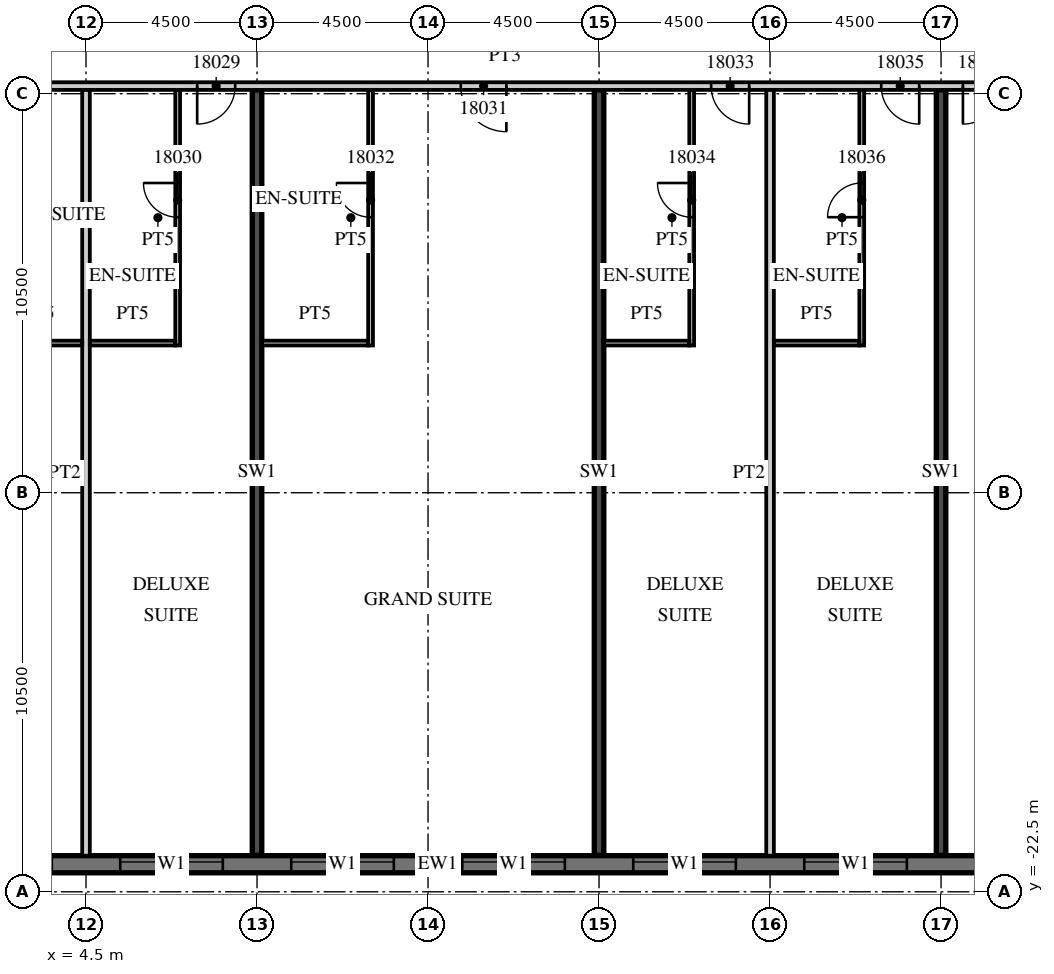
"""IFC4 building model, lengths in metres.
Left out: names, types, materials, properties, quantities, classifications, styles, units other than length and angle.
Written with IfcOpenShell. Run it as: python <this file> out.ifc"""

import sys

from ifc_helpers import new_model, si_unit, direction, frame, frame_2d, origin, place, context, subcontext, project, spatial, rectangle, extrude, element, fill, save


model = new_model("IFC4")
c1 = context("Model", 3, precision=1e-05, world=origin(), true_north=direction((0.0, 1.0)))
c2 = subcontext(c1, "Body", "Model", "MODEL_VIEW")
j1 = project(units=[si_unit("LENGTHUNIT", "METRE"), si_unit("PLANEANGLEUNIT", "RADIAN")], contexts=[c1])
p1 = place(None, origin())
s1 = spatial("IfcSite", under=j1, at=p1, CompositionType="ELEMENT")
p2 = place(p1, origin())
s2 = spatial("IfcBuilding", under=s1, at=p2, CompositionType="ELEMENT")
p3 = place(p2, frame((0.0, 0.0, 89.7)))
s3 = spatial("IfcBuildingStorey", under=s2, at=p3, CompositionType="ELEMENT", Elevation=89.7)
for number, where, z_axis, x_axis in (
    (1, (9.0, -21.54, 0.0), (0.0, 0.0, 1.0), (0.0, 1.0, 0.0)),
    (2, (18.0, -21.54, 0.0), (0.0, 0.0, 1.0), (0.0, 1.0, 0.0)),
    (3, (27.0, -21.54, 0.0), (0.0, 0.0, 1.0), (0.0, 1.0, 0.0)),
):
    element("IfcWall", number, at=place(p3, frame(where, z_axis=z_axis, x_axis=x_axis)), inside=s3, PredefinedType="SHEAR", context=c2, shape_type="SweptSolid", body=[
        extrude(rectangle(XDim=20.14, YDim=0.25, at=frame_2d((10.07, 0.0))), origin(), (0.0, 0.0, 1.0), 3.3),
    ])
p4 = place(p3, frame((-13.5, -21.775, 0.0), z_axis=(0.0, 0.0, 1.0), x_axis=(1.0, 0.0, 0.0)))
e4 = element("IfcWall", 4, at=p4, inside=s3, PredefinedType="SOLIDWALL", context=c2, shape_type="SweptSolid", body=[
    extrude(rectangle(XDim=54.5, YDim=0.45, at=frame_2d((27.25, 0.0))), origin(), (0.0, 0.0, 1.0), 3.02),
])
p5 = place(p4, frame((0.9, 0.0, 0.45)))
e5 = element("IfcOpeningElement", 5, at=p5, cuts=e4, PredefinedType="OPENING", context=c2, shape_type="SweptSolid", body=[
    extrude(rectangle(XDim=2.7, YDim=2.25, at=frame_2d((1.35, 1.125))), frame((0.0, 0.235, 0.0), z_axis=(0.0, -1.0, 0.0), x_axis=(1.0, 0.0, 0.0)), (0.0, 0.0, 1.0), 0.47),
])
p6 = place(p4, frame((5.4, 0.0, 0.45)))
e6 = element("IfcOpeningElement", 6, at=p6, cuts=e4, PredefinedType="OPENING", context=c2, shape_type="SweptSolid", body=[
    extrude(rectangle(XDim=2.7, YDim=2.25, at=frame_2d((1.35, 1.125))), frame((0.0, 0.235, 0.0), z_axis=(0.0, -1.0, 0.0), x_axis=(1.0, 0.0, 0.0)), (0.0, 0.0, 1.0), 0.47),
])
p7 = place(p4, frame((9.9, 0.0, 0.45)))
e7 = element("IfcOpeningElement", 7, at=p7, cuts=e4, PredefinedType="OPENING", context=c2, shape_type="SweptSolid", body=[
    extrude(rectangle(XDim=2.7, YDim=2.25, at=frame_2d((1.35, 1.125))), frame((0.0, 0.235, 0.0), z_axis=(0.0, -1.0, 0.0), x_axis=(1.0, 0.0, 0.0)), (0.0, 0.0, 1.0), 0.47),
])
p8 = place(p4, frame((14.4, 0.0, 0.45)))
e8 = element("IfcOpeningElement", 8, at=p8, cuts=e4, PredefinedType="OPENING", context=c2, shape_type="SweptSolid", body=[
    extrude(rectangle(XDim=2.7, YDim=2.25, at=frame_2d((1.35, 1.125))), frame((0.0, 0.235, 0.0), z_axis=(0.0, -1.0, 0.0), x_axis=(1.0, 0.0, 0.0)), (0.0, 0.0, 1.0), 0.47),
])
p9 = place(p4, frame((18.9, 0.0, 0.45)))
e9 = element("IfcOpeningElement", 9, at=p9, cuts=e4, PredefinedType="OPENING", context=c2, shape_type="SweptSolid", body=[
    extrude(rectangle(XDim=2.7, YDim=2.25, at=frame_2d((1.35, 1.125))), frame((0.0, 0.235, 0.0), z_axis=(0.0, -1.0, 0.0), x_axis=(1.0, 0.0, 0.0)), (0.0, 0.0, 1.0), 0.47),
])
p10 = place(p4, frame((23.4, 0.0, 0.45)))
e10 = element("IfcOpeningElement", 10, at=p10, cuts=e4, PredefinedType="OPENING", context=c2, shape_type="SweptSolid", body=[
    extrude(rectangle(XDim=2.7, YDim=2.25, at=frame_2d((1.35, 1.125))), frame((0.0, 0.235, 0.0), z_axis=(0.0, -1.0, 0.0), x_axis=(1.0, 0.0, 0.0)), (0.0, 0.0, 1.0), 0.47),
])
p11 = place(p4, frame((27.9, 0.0, 0.45)))
e11 = element("IfcOpeningElement", 11, at=p11, cuts=e4, PredefinedType="OPENING", context=c2, shape_type="SweptSolid", body=[
    extrude(rectangle(XDim=2.7, YDim=2.25, at=frame_2d((1.35, 1.125))), frame((0.0, 0.235, 0.0), z_axis=(0.0, -1.0, 0.0), x_axis=(1.0, 0.0, 0.0)), (0.0, 0.0, 1.0), 0.47),
])
p12 = place(p4, frame((32.4, 0.0, 0.45)))
e12 = element("IfcOpeningElement", 12, at=p12, cuts=e4, PredefinedType="OPENING", context=c2, shape_type="SweptSolid", body=[
    extrude(rectangle(XDim=2.7, YDim=2.25, at=frame_2d((1.35, 1.125))), frame((0.0, 0.235, 0.0), z_axis=(0.0, -1.0, 0.0), x_axis=(1.0, 0.0, 0.0)), (0.0, 0.0, 1.0), 0.47),
])
p13 = place(p4, frame((36.9, 0.0, 0.45)))
e13 = element("IfcOpeningElement", 13, at=p13, cuts=e4, PredefinedType="OPENING", context=c2, shape_type="SweptSolid", body=[
    extrude(rectangle(XDim=2.7, YDim=2.25, at=frame_2d((1.35, 1.125))), frame((0.0, 0.235, 0.0), z_axis=(0.0, -1.0, 0.0), x_axis=(1.0, 0.0, 0.0)), (0.0, 0.0, 1.0), 0.47),
])
p14 = place(p4, frame((41.4, 0.0, 0.45)))
e14 = element("IfcOpeningElement", 14, at=p14, cuts=e4, PredefinedType="OPENING", context=c2, shape_type="SweptSolid", body=[
    extrude(rectangle(XDim=2.7, YDim=2.25, at=frame_2d((1.35, 1.125))), frame((0.0, 0.235, 0.0), z_axis=(0.0, -1.0, 0.0), x_axis=(1.0, 0.0, 0.0)), (0.0, 0.0, 1.0), 0.47),
])
p15 = place(p4, frame((45.9, 0.0, 0.45)))
e15 = element("IfcOpeningElement", 15, at=p15, cuts=e4, PredefinedType="OPENING", context=c2, shape_type="SweptSolid", body=[
    extrude(rectangle(XDim=2.7, YDim=2.25, at=frame_2d((1.35, 1.125))), frame((0.0, 0.235, 0.0), z_axis=(0.0, -1.0, 0.0), x_axis=(1.0, 0.0, 0.0)), (0.0, 0.0, 1.0), 0.47),
])
p16 = place(p4, frame((50.4, 0.0, 0.45)))
e16 = element("IfcOpeningElement", 16, at=p16, cuts=e4, PredefinedType="OPENING", context=c2, shape_type="SweptSolid", body=[
    extrude(rectangle(XDim=2.7, YDim=2.25, at=frame_2d((1.35, 1.125))), frame((0.0, 0.235, 0.0), z_axis=(0.0, -1.0, 0.0), x_axis=(1.0, 0.0, 0.0)), (0.0, 0.0, 1.0), 0.47),
])
p17 = place(p3, frame((-13.5, -1.3, 0.0), z_axis=(0.0, 0.0, 1.0), x_axis=(1.0, 0.0, 0.0)))
e17 = element("IfcWall", 17, at=p17, inside=s3, PredefinedType="PARTITIONING", context=c2, shape_type="SweptSolid", body=[
    extrude(rectangle(XDim=58.05, YDim=0.2, at=frame_2d((29.025, 0.0))), origin(), (0.0, 0.0, 1.0), 3.02),
])
p18 = place(p17, frame((2.925, 0.0, 0.0)))
e18 = element("IfcOpeningElement", 18, at=p18, cuts=e17, PredefinedType="OPENING", context=c2, shape_type="SweptSolid", body=[
    extrude(rectangle(XDim=1.0, YDim=2.1, at=frame_2d((0.5, 1.05))), frame((0.0, 0.11, 0.0), z_axis=(0.0, -1.0, 0.0), x_axis=(1.0, 0.0, 0.0)), (0.0, 0.0, 1.0), 0.22),
])
p19 = place(p17, frame((5.075, 0.0, 0.0)))
e19 = element("IfcOpeningElement", 19, at=p19, cuts=e17, PredefinedType="OPENING", context=c2, shape_type="SweptSolid", body=[
    extrude(rectangle(XDim=1.0, YDim=2.1, at=frame_2d((0.5, 1.05))), frame((0.0, 0.11, 0.0), z_axis=(0.0, -1.0, 0.0), x_axis=(1.0, 0.0, 0.0)), (0.0, 0.0, 1.0), 0.22),
])
p20 = place(p17, frame((9.55, 0.0, 0.0)))
e20 = element("IfcOpeningElement", 20, at=p20, cuts=e17, PredefinedType="OPENING", context=c2, shape_type="SweptSolid", body=[
    extrude(rectangle(XDim=1.0, YDim=2.1, at=frame_2d((0.5, 1.05))), frame((0.0, 0.11, 0.0), z_axis=(0.0, -1.0, 0.0), x_axis=(1.0, 0.0, 0.0)), (0.0, 0.0, 1.0), 0.22),
])
p21 = place(p17, frame((14.075, 0.0, 0.0)))
e21 = element("IfcOpeningElement", 21, at=p21, cuts=e17, PredefinedType="OPENING", context=c2, shape_type="SweptSolid", body=[
    extrude(rectangle(XDim=1.0, YDim=2.1, at=frame_2d((0.5, 1.05))), frame((0.0, 0.11, 0.0), z_axis=(0.0, -1.0, 0.0), x_axis=(1.0, 0.0, 0.0)), (0.0, 0.0, 1.0), 0.22),
])
p22 = place(p17, frame((20.925, 0.0, 0.0)))
e22 = element("IfcOpeningElement", 22, at=p22, cuts=e17, PredefinedType="OPENING", context=c2, shape_type="SweptSolid", body=[
    extrude(rectangle(XDim=1.0, YDim=2.1, at=frame_2d((0.5, 1.05))), frame((0.0, 0.11, 0.0), z_axis=(0.0, -1.0, 0.0), x_axis=(1.0, 0.0, 0.0)), (0.0, 0.0, 1.0), 0.22),
])
p23 = place(p17, frame((27.862, 0.0, 0.0)))
e23 = element("IfcOpeningElement", 23, at=p23, cuts=e17, PredefinedType="OPENING", context=c2, shape_type="SweptSolid", body=[
    extrude(rectangle(XDim=1.2, YDim=2.1, at=frame_2d((0.6, 1.05))), frame((0.0, 0.11, 0.0), z_axis=(0.0, -1.0, 0.0), x_axis=(1.0, 0.0, 0.0)), (0.0, 0.0, 1.0), 0.22),
])
p24 = place(p17, frame((34.45, 0.0, 0.0)))
e24 = element("IfcOpeningElement", 24, at=p24, cuts=e17, PredefinedType="OPENING", context=c2, shape_type="SweptSolid", body=[
    extrude(rectangle(XDim=1.0, YDim=2.1, at=frame_2d((0.5, 1.05))), frame((0.0, 0.11, 0.0), z_axis=(0.0, -1.0, 0.0), x_axis=(1.0, 0.0, 0.0)), (0.0, 0.0, 1.0), 0.22),
])
p25 = place(p17, frame((38.925, 0.0, 0.0)))
e25 = element("IfcOpeningElement", 25, at=p25, cuts=e17, PredefinedType="OPENING", context=c2, shape_type="SweptSolid", body=[
    extrude(rectangle(XDim=1.0, YDim=2.1, at=frame_2d((0.5, 1.05))), frame((0.0, 0.11, 0.0), z_axis=(0.0, -1.0, 0.0), x_axis=(1.0, 0.0, 0.0)), (0.0, 0.0, 1.0), 0.22),
])
p26 = place(p17, frame((41.075, 0.0, 0.0)))
e26 = element("IfcOpeningElement", 26, at=p26, cuts=e17, PredefinedType="OPENING", context=c2, shape_type="SweptSolid", body=[
    extrude(rectangle(XDim=1.0, YDim=2.1, at=frame_2d((0.5, 1.05))), frame((0.0, 0.11, 0.0), z_axis=(0.0, -1.0, 0.0), x_axis=(1.0, 0.0, 0.0)), (0.0, 0.0, 1.0), 0.22),
])
p27 = place(p17, frame((45.55, 0.0, 0.0)))
e27 = element("IfcOpeningElement", 27, at=p27, cuts=e17, PredefinedType="OPENING", context=c2, shape_type="SweptSolid", body=[
    extrude(rectangle(XDim=1.0, YDim=2.1, at=frame_2d((0.5, 1.05))), frame((0.0, 0.11, 0.0), z_axis=(0.0, -1.0, 0.0), x_axis=(1.0, 0.0, 0.0)), (0.0, 0.0, 1.0), 0.22),
])
p28 = place(p17, frame((50.075, 0.0, 0.0)))
e28 = element("IfcOpeningElement", 28, at=p28, cuts=e17, PredefinedType="OPENING", context=c2, shape_type="SweptSolid", body=[
    extrude(rectangle(XDim=1.0, YDim=2.1, at=frame_2d((0.5, 1.05))), frame((0.0, 0.11, 0.0), z_axis=(0.0, -1.0, 0.0), x_axis=(1.0, 0.0, 0.0)), (0.0, 0.0, 1.0), 0.22),
])
p29 = place(p17, frame((56.525, 0.0, 0.0)))
e29 = element("IfcOpeningElement", 29, at=p29, cuts=e17, PredefinedType="OPENING", context=c2, shape_type="SweptSolid", body=[
    extrude(rectangle(XDim=1.0, YDim=2.1, at=frame_2d((0.5, 1.05))), frame((0.0, 0.11, 0.0), z_axis=(0.0, -1.0, 0.0), x_axis=(1.0, 0.0, 0.0)), (0.0, 0.0, 1.0), 0.22),
])
p30 = place(p3, frame((4.5, -21.55, 0.0), z_axis=(0.0, 0.0, 1.0), x_axis=(0.0, 1.0, 0.0)))
e30 = element("IfcWall", 30, at=p30, inside=s3, PredefinedType="PARTITIONING", context=c2, shape_type="SweptSolid", body=[
    extrude(rectangle(XDim=20.15, YDim=0.2, at=frame_2d((10.075, 0.0))), origin(), (0.0, 0.0, 1.0), 3.02),
])
p31 = place(p3, frame((2.15, -8.062, 0.0), z_axis=(0.0, 0.0, 1.0), x_axis=(1.0, 0.0, 0.0)))
e31 = element("IfcWall", 31, at=p31, inside=s3, PredefinedType="PARTITIONING", context=c2, shape_type="SweptSolid", body=[
    extrude(rectangle(XDim=2.25, YDim=0.125, at=frame_2d((1.125, 0.0))), origin(), (0.0, 0.0, 1.0), 3.02),
])
p32 = place(p3, frame((6.912, -8.125, 0.0), z_axis=(0.0, 0.0, 1.0), x_axis=(0.0, 1.0, 0.0)))
e32 = element("IfcWall", 32, at=p32, inside=s3, PredefinedType="PARTITIONING", context=c2, shape_type="SweptSolid", body=[
    extrude(rectangle(XDim=6.725, YDim=0.125, at=frame_2d((3.363, 0.0))), origin(), (0.0, 0.0, 1.0), 3.02),
])
p33 = place(p32, frame((3.375, 0.0, 0.0)))
e33 = element("IfcOpeningElement", 33, at=p33, cuts=e32, PredefinedType="OPENING", context=c2, shape_type="SweptSolid", body=[
    extrude(rectangle(XDim=0.9, YDim=2.1, at=frame_2d((0.45, 1.05))), frame((0.0, 0.073, 0.0), z_axis=(0.0, -1.0, 0.0), x_axis=(1.0, 0.0, 0.0)), (0.0, 0.0, 1.0), 0.145),
])
p34 = place(p3, frame((4.6, -8.062, 0.0), z_axis=(0.0, 0.0, 1.0), x_axis=(1.0, 0.0, 0.0)))
e34 = element("IfcWall", 34, at=p34, inside=s3, PredefinedType="PARTITIONING", context=c2, shape_type="SweptSolid", body=[
    extrude(rectangle(XDim=2.25, YDim=0.125, at=frame_2d((1.125, 0.0))), origin(), (0.0, 0.0, 1.0), 3.02),
])
p35 = place(p3, frame((11.988, -8.125, 0.0), z_axis=(0.0, 0.0, 1.0), x_axis=(0.0, 1.0, 0.0)))
e35 = element("IfcWall", 35, at=p35, inside=s3, PredefinedType="PARTITIONING", context=c2, shape_type="SweptSolid", body=[
    extrude(rectangle(XDim=6.725, YDim=0.125, at=frame_2d((3.363, 0.0))), origin(), (0.0, 0.0, 1.0), 3.02),
])
p36 = place(p35, frame((3.375, 0.0, 0.0)))
e36 = element("IfcOpeningElement", 36, at=p36, cuts=e35, PredefinedType="OPENING", context=c2, shape_type="SweptSolid", body=[
    extrude(rectangle(XDim=0.9, YDim=2.1, at=frame_2d((0.45, 1.05))), frame((0.0, 0.073, 0.0), z_axis=(0.0, -1.0, 0.0), x_axis=(1.0, 0.0, 0.0)), (0.0, 0.0, 1.0), 0.145),
])
p37 = place(p3, frame((9.125, -8.062, 0.0), z_axis=(0.0, 0.0, 1.0), x_axis=(1.0, 0.0, 0.0)))
e37 = element("IfcWall", 37, at=p37, inside=s3, PredefinedType="PARTITIONING", context=c2, shape_type="SweptSolid", body=[
    extrude(rectangle(XDim=2.8, YDim=0.125, at=frame_2d((1.4, 0.0))), origin(), (0.0, 0.0, 1.0), 3.02),
])
p38 = place(p3, frame((22.5, -21.55, 0.0), z_axis=(0.0, 0.0, 1.0), x_axis=(0.0, 1.0, 0.0)))
e38 = element("IfcWall", 38, at=p38, inside=s3, PredefinedType="PARTITIONING", context=c2, shape_type="SweptSolid", body=[
    extrude(rectangle(XDim=20.15, YDim=0.2, at=frame_2d((10.075, 0.0))), origin(), (0.0, 0.0, 1.0), 3.02),
])
p39 = place(p3, frame((20.438, -8.125, 0.0), z_axis=(0.0, 0.0, 1.0), x_axis=(0.0, 1.0, 0.0)))
e39 = element("IfcWall", 39, at=p39, inside=s3, PredefinedType="PARTITIONING", context=c2, shape_type="SweptSolid", body=[
    extrude(rectangle(XDim=6.725, YDim=0.125, at=frame_2d((3.363, 0.0))), origin(), (0.0, 0.0, 1.0), 3.02),
])
p40 = place(p39, frame((3.375, 0.0, 0.0)))
e40 = element("IfcOpeningElement", 40, at=p40, cuts=e39, PredefinedType="OPENING", context=c2, shape_type="SweptSolid", body=[
    extrude(rectangle(XDim=0.9, YDim=2.1, at=frame_2d((0.45, 1.05))), frame((0.0, 0.073, 0.0), z_axis=(0.0, -1.0, 0.0), x_axis=(1.0, 0.0, 0.0)), (0.0, 0.0, 1.0), 0.145),
])
p41 = place(p3, frame((18.125, -8.062, 0.0), z_axis=(0.0, 0.0, 1.0), x_axis=(1.0, 0.0, 0.0)))
e41 = element("IfcWall", 41, at=p41, inside=s3, PredefinedType="PARTITIONING", context=c2, shape_type="SweptSolid", body=[
    extrude(rectangle(XDim=2.25, YDim=0.125, at=frame_2d((1.125, 0.0))), origin(), (0.0, 0.0, 1.0), 3.02),
])
p42 = place(p3, frame((24.913, -8.125, 0.0), z_axis=(0.0, 0.0, 1.0), x_axis=(0.0, 1.0, 0.0)))
e42 = element("IfcWall", 42, at=p42, inside=s3, PredefinedType="PARTITIONING", context=c2, shape_type="SweptSolid", body=[
    extrude(rectangle(XDim=6.725, YDim=0.125, at=frame_2d((3.363, 0.0))), origin(), (0.0, 0.0, 1.0), 3.02),
])
p43 = place(p42, frame((3.375, 0.0, 0.0)))
e43 = element("IfcOpeningElement", 43, at=p43, cuts=e42, PredefinedType="OPENING", context=c2, shape_type="SweptSolid", body=[
    extrude(rectangle(XDim=0.9, YDim=2.1, at=frame_2d((0.45, 1.05))), frame((0.0, 0.073, 0.0), z_axis=(0.0, -1.0, 0.0), x_axis=(1.0, 0.0, 0.0)), (0.0, 0.0, 1.0), 0.145),
])
p44 = place(p3, frame((22.6, -8.062, 0.0), z_axis=(0.0, 0.0, 1.0), x_axis=(1.0, 0.0, 0.0)))
e44 = element("IfcWall", 44, at=p44, inside=s3, PredefinedType="PARTITIONING", context=c2, shape_type="SweptSolid", body=[
    extrude(rectangle(XDim=2.25, YDim=0.125, at=frame_2d((1.125, 0.0))), origin(), (0.0, 0.0, 1.0), 3.02),
])
p45 = place(p9, origin())
e45 = element("IfcWindow", 45, at=p45, inside=s3, PartitioningType="SINGLE_PANEL", PredefinedType="WINDOW", context=c2, shape_type="SweptSolid", body=[
    extrude(rectangle(XDim=2.7, YDim=2.25, at=frame_2d((1.35, 1.125))), frame((0.0, 0.09, 0.0), z_axis=(0.0, -1.0, 0.0), x_axis=(1.0, 0.0, 0.0)), (0.0, 0.0, 1.0), 0.06),
])
fill(e9, e45)
p46 = place(p10, origin())
e46 = element("IfcWindow", 46, at=p46, inside=s3, PartitioningType="SINGLE_PANEL", PredefinedType="WINDOW", context=c2, shape_type="SweptSolid", body=[
    extrude(rectangle(XDim=2.7, YDim=2.25, at=frame_2d((1.35, 1.125))), frame((0.0, 0.09, 0.0), z_axis=(0.0, -1.0, 0.0), x_axis=(1.0, 0.0, 0.0)), (0.0, 0.0, 1.0), 0.06),
])
fill(e10, e46)
p47 = place(p11, origin())
e47 = element("IfcWindow", 47, at=p47, inside=s3, PartitioningType="SINGLE_PANEL", PredefinedType="WINDOW", context=c2, shape_type="SweptSolid", body=[
    extrude(rectangle(XDim=2.7, YDim=2.25, at=frame_2d((1.35, 1.125))), frame((0.0, 0.09, 0.0), z_axis=(0.0, -1.0, 0.0), x_axis=(1.0, 0.0, 0.0)), (0.0, 0.0, 1.0), 0.06),
])
fill(e11, e47)
p48 = place(p12, origin())
e48 = element("IfcWindow", 48, at=p48, inside=s3, PartitioningType="SINGLE_PANEL", PredefinedType="WINDOW", context=c2, shape_type="SweptSolid", body=[
    extrude(rectangle(XDim=2.7, YDim=2.25, at=frame_2d((1.35, 1.125))), frame((0.0, 0.09, 0.0), z_axis=(0.0, -1.0, 0.0), x_axis=(1.0, 0.0, 0.0)), (0.0, 0.0, 1.0), 0.06),
])
fill(e12, e48)
p49 = place(p13, origin())
e49 = element("IfcWindow", 49, at=p49, inside=s3, PartitioningType="SINGLE_PANEL", PredefinedType="WINDOW", context=c2, shape_type="SweptSolid", body=[
    extrude(rectangle(XDim=2.7, YDim=2.25, at=frame_2d((1.35, 1.125))), frame((0.0, 0.09, 0.0), z_axis=(0.0, -1.0, 0.0), x_axis=(1.0, 0.0, 0.0)), (0.0, 0.0, 1.0), 0.06),
])
fill(e13, e49)
p50 = place(p22, origin())
e50 = element("IfcDoor", 50, at=p50, inside=s3, OperationType="SINGLE_SWING_LEFT", PredefinedType="DOOR", context=c2, shape_type="SweptSolid", body=[
    extrude(rectangle(XDim=1.0, YDim=2.1, at=frame_2d((0.5, 1.05))), frame((0.0, 0.025, 0.0), z_axis=(0.0, -1.0, 0.0), x_axis=(1.0, 0.0, 0.0)), (0.0, 0.0, 1.0), 0.05),
])
fill(e22, e50)
p51 = place(p33, origin())
e51 = element("IfcDoor", 51, at=p51, inside=s3, OperationType="SINGLE_SWING_RIGHT", PredefinedType="DOOR", context=c2, shape_type="SweptSolid", body=[
    extrude(rectangle(XDim=0.9, YDim=2.1, at=frame_2d((0.45, 1.05))), frame((0.0, 0.025, 0.0), z_axis=(0.0, -1.0, 0.0), x_axis=(1.0, 0.0, 0.0)), (0.0, 0.0, 1.0), 0.05),
])
fill(e33, e51)
p52 = place(p23, origin())
e52 = element("IfcDoor", 52, at=p52, inside=s3, OperationType="SINGLE_SWING_RIGHT", PredefinedType="DOOR", context=c2, shape_type="SweptSolid", body=[
    extrude(rectangle(XDim=1.2, YDim=2.1, at=frame_2d((0.6, 1.05))), frame((0.0, 0.025, 0.0), z_axis=(0.0, -1.0, 0.0), x_axis=(1.0, 0.0, 0.0)), (0.0, 0.0, 1.0), 0.05),
])
fill(e23, e52)
p53 = place(p36, origin())
e53 = element("IfcDoor", 53, at=p53, inside=s3, OperationType="SINGLE_SWING_RIGHT", PredefinedType="DOOR", context=c2, shape_type="SweptSolid", body=[
    extrude(rectangle(XDim=0.9, YDim=2.1, at=frame_2d((0.45, 1.05))), frame((0.0, 0.025, 0.0), z_axis=(0.0, -1.0, 0.0), x_axis=(1.0, 0.0, 0.0)), (0.0, 0.0, 1.0), 0.05),
])
fill(e36, e53)
p54 = place(p24, origin())
e54 = element("IfcDoor", 54, at=p54, inside=s3, OperationType="SINGLE_SWING_RIGHT", PredefinedType="DOOR", context=c2, shape_type="SweptSolid", body=[
    extrude(rectangle(XDim=1.0, YDim=2.1, at=frame_2d((0.5, 1.05))), frame((0.0, 0.025, 0.0), z_axis=(0.0, -1.0, 0.0), x_axis=(1.0, 0.0, 0.0)), (0.0, 0.0, 1.0), 0.05),
])
fill(e24, e54)
p55 = place(p40, origin())
e55 = element("IfcDoor", 55, at=p55, inside=s3, OperationType="SINGLE_SWING_RIGHT", PredefinedType="DOOR", context=c2, shape_type="SweptSolid", body=[
    extrude(rectangle(XDim=0.9, YDim=2.1, at=frame_2d((0.45, 1.05))), frame((0.0, 0.025, 0.0), z_axis=(0.0, -1.0, 0.0), x_axis=(1.0, 0.0, 0.0)), (0.0, 0.0, 1.0), 0.05),
])
fill(e40, e55)
p56 = place(p25, origin())
e56 = element("IfcDoor", 56, at=p56, inside=s3, OperationType="SINGLE_SWING_RIGHT", PredefinedType="DOOR", context=c2, shape_type="SweptSolid", body=[
    extrude(rectangle(XDim=1.0, YDim=2.1, at=frame_2d((0.5, 1.05))), frame((0.0, 0.025, 0.0), z_axis=(0.0, -1.0, 0.0), x_axis=(1.0, 0.0, 0.0)), (0.0, 0.0, 1.0), 0.05),
])
fill(e25, e56)
p57 = place(p43, origin())
e57 = element("IfcDoor", 57, at=p57, inside=s3, OperationType="SINGLE_SWING_LEFT", PredefinedType="DOOR", context=c2, shape_type="SweptSolid", body=[
    extrude(rectangle(XDim=0.9, YDim=2.1, at=frame_2d((0.45, 1.05))), frame((0.0, 0.025, 0.0), z_axis=(0.0, -1.0, 0.0), x_axis=(1.0, 0.0, 0.0)), (0.0, 0.0, 1.0), 0.05),
])
fill(e43, e57)
p58 = place(p26, origin())
e58 = element("IfcDoor", 58, at=p58, inside=s3, OperationType="SINGLE_SWING_LEFT", PredefinedType="DOOR", context=c2, shape_type="SweptSolid", body=[
    extrude(rectangle(XDim=1.0, YDim=2.1, at=frame_2d((0.5, 1.05))), frame((0.0, 0.025, 0.0), z_axis=(0.0, -1.0, 0.0), x_axis=(1.0, 0.0, 0.0)), (0.0, 0.0, 1.0), 0.05),
])
fill(e26, e58)
save(model, sys.argv[1])
